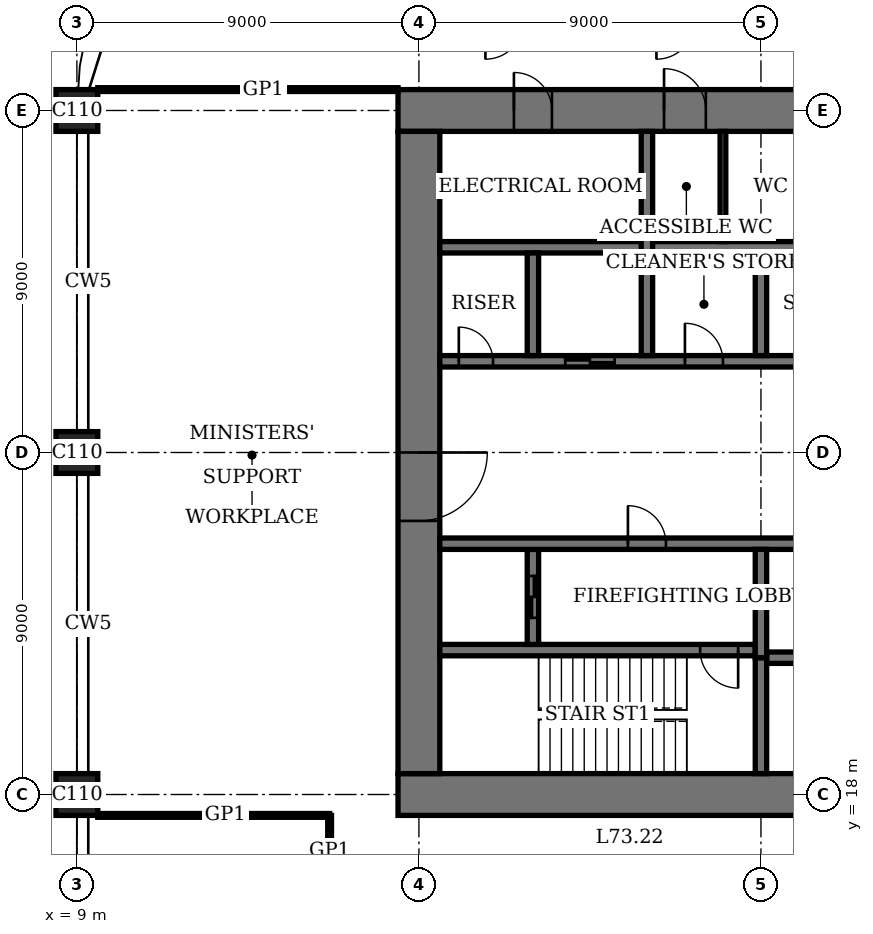
"""IFC4 building model, lengths in metres.
Left out: names, types, materials, properties, quantities, classifications, styles, units other than length and angle.
Written with IfcOpenShell. Run it as: python <this file> out.ifc"""

import sys

from ifc_helpers import new_model, si_unit, direction, frame, frame_2d, origin, origin_2d, place, context, subcontext, project, spatial, rectangle, extrude, element, fill, save


model = new_model("IFC4")
c1 = context("Model", 3, precision=1e-05, world=origin(), true_north=direction((0.0, 1.0)))
c2 = subcontext(c1, "Body", "Model", "MODEL_VIEW")
j1 = project(units=[si_unit("LENGTHUNIT", "METRE"), si_unit("PLANEANGLEUNIT", "RADIAN")], contexts=[c1])
p1 = place(None, origin())
s1 = spatial("IfcSite", under=j1, at=p1, CompositionType="ELEMENT")
p2 = place(p1, origin())
s2 = spatial("IfcBuilding", under=s1, at=p2, CompositionType="ELEMENT")
p3 = place(p2, frame((0.0, 0.0, 299.4)))
s3 = spatial("IfcBuildingStorey", under=s2, at=p3, CompositionType="ELEMENT", Elevation=299.4)
for number, where, z_axis, x_axis in (
    (1, (9.0, 18.0, 0.0), (0.0, 0.0, 1.0), (1.0, 0.0, 0.0)),
    (2, (9.0, 27.0, 0.0), (0.0, 0.0, 1.0), (1.0, 0.0, 0.0)),
    (3, (9.0, 36.0, 0.0), (0.0, 0.0, 1.0), (1.0, 0.0, 0.0)),
):
    element("IfcColumn", number, at=place(p3, frame(where, z_axis=z_axis, x_axis=x_axis)), inside=s3, PredefinedType="COLUMN", context=c2, shape_type="SweptSolid", body=[
        extrude(rectangle(XDim=1.1, YDim=1.1, at=origin_2d()), origin(), (0.0, 0.0, 1.0), 4.0),
    ])
p4 = place(p3, frame((17.45, 18.0, 0.0), z_axis=(0.0, 0.0, 1.0), x_axis=(1.0, 0.0, 0.0)))
e4 = element("IfcWall", 4, at=p4, inside=s3, PredefinedType="SHEAR", context=c2, shape_type="SweptSolid", body=[
    extrude(rectangle(XDim=28.1, YDim=1.1, at=frame_2d((14.05, 0.0))), origin(), (0.0, 0.0, 1.0), 4.0),
])
p5 = place(p4, frame((11.55, 0.0, 0.0)))
e5 = element("IfcOpeningElement", 5, at=p5, cuts=e4, PredefinedType="OPENING", context=c2, shape_type="SweptSolid", body=[
    extrude(rectangle(XDim=1.0, YDim=2.4, at=frame_2d((0.5, 1.2))), frame((0.0, 0.56, 0.0), z_axis=(0.0, -1.0, 0.0), x_axis=(1.0, 0.0, 0.0)), (0.0, 0.0, 1.0), 1.12),
])
p6 = place(p4, frame((16.55, 0.0, 0.0)))
e6 = element("IfcOpeningElement", 6, at=p6, cuts=e4, PredefinedType="OPENING", context=c2, shape_type="SweptSolid", body=[
    extrude(rectangle(XDim=1.0, YDim=2.4, at=frame_2d((0.5, 1.2))), frame((0.0, 0.56, 0.0), z_axis=(0.0, -1.0, 0.0), x_axis=(1.0, 0.0, 0.0)), (0.0, 0.0, 1.0), 1.12),
])
p7 = place(p4, frame((20.0, 0.0, 0.0)))
e7 = element("IfcOpeningElement", 7, at=p7, cuts=e4, PredefinedType="OPENING", context=c2, shape_type="SweptSolid", body=[
    extrude(rectangle(XDim=1.1, YDim=2.4, at=frame_2d((0.55, 1.2))), frame((0.0, 0.56, 0.0), z_axis=(0.0, -1.0, 0.0), x_axis=(1.0, 0.0, 0.0)), (0.0, 0.0, 1.0), 1.12),
])
p8 = place(p4, frame((24.05, 0.0, 0.0)))
e8 = element("IfcOpeningElement", 8, at=p8, cuts=e4, PredefinedType="OPENING", context=c2, shape_type="SweptSolid", body=[
    extrude(rectangle(XDim=1.0, YDim=2.4, at=frame_2d((0.5, 1.2))), frame((0.0, 0.56, 0.0), z_axis=(0.0, -1.0, 0.0), x_axis=(1.0, 0.0, 0.0)), (0.0, 0.0, 1.0), 1.12),
])
p9 = place(p3, frame((45.55, 36.0, 0.0), z_axis=(0.0, 0.0, 1.0), x_axis=(-1.0, 0.0, 0.0)))
e9 = element("IfcWall", 9, at=p9, inside=s3, PredefinedType="SHEAR", context=c2, shape_type="SweptSolid", body=[
    extrude(rectangle(XDim=28.1, YDim=1.1, at=frame_2d((14.05, 0.0))), origin(), (0.0, 0.0, 1.0), 4.0),
])
p10 = place(p9, frame((11.55, 0.0, 0.0)))
e10 = element("IfcOpeningElement", 10, at=p10, cuts=e9, PredefinedType="OPENING", context=c2, shape_type="SweptSolid", body=[
    extrude(rectangle(XDim=1.0, YDim=2.4, at=frame_2d((0.5, 1.2))), frame((0.0, 0.56, 0.0), z_axis=(0.0, -1.0, 0.0), x_axis=(1.0, 0.0, 0.0)), (0.0, 0.0, 1.0), 1.12),
])
p11 = place(p9, frame((16.55, 0.0, 0.0)))
e11 = element("IfcOpeningElement", 11, at=p11, cuts=e9, PredefinedType="OPENING", context=c2, shape_type="SweptSolid", body=[
    extrude(rectangle(XDim=1.0, YDim=2.4, at=frame_2d((0.5, 1.2))), frame((0.0, 0.56, 0.0), z_axis=(0.0, -1.0, 0.0), x_axis=(1.0, 0.0, 0.0)), (0.0, 0.0, 1.0), 1.12),
])
p12 = place(p9, frame((20.0, 0.0, 0.0)))
e12 = element("IfcOpeningElement", 12, at=p12, cuts=e9, PredefinedType="OPENING", context=c2, shape_type="SweptSolid", body=[
    extrude(rectangle(XDim=1.1, YDim=2.4, at=frame_2d((0.55, 1.2))), frame((0.0, 0.56, 0.0), z_axis=(0.0, -1.0, 0.0), x_axis=(1.0, 0.0, 0.0)), (0.0, 0.0, 1.0), 1.12),
])
p13 = place(p9, frame((24.05, 0.0, 0.0)))
e13 = element("IfcOpeningElement", 13, at=p13, cuts=e9, PredefinedType="OPENING", context=c2, shape_type="SweptSolid", body=[
    extrude(rectangle(XDim=1.0, YDim=2.4, at=frame_2d((0.5, 1.2))), frame((0.0, 0.56, 0.0), z_axis=(0.0, -1.0, 0.0), x_axis=(1.0, 0.0, 0.0)), (0.0, 0.0, 1.0), 1.12),
])
p14 = place(p3, frame((18.0, 35.45, 0.0), z_axis=(0.0, 0.0, 1.0), x_axis=(0.0, -1.0, 0.0)))
e14 = element("IfcWall", 14, at=p14, inside=s3, PredefinedType="SHEAR", context=c2, shape_type="SweptSolid", body=[
    extrude(rectangle(XDim=16.9, YDim=1.1, at=frame_2d((8.45, 0.0))), origin(), (0.0, 0.0, 1.0), 4.0),
])
p15 = place(p14, frame((8.45, 0.0, 0.0)))
e15 = element("IfcOpeningElement", 15, at=p15, cuts=e14, PredefinedType="OPENING", context=c2, shape_type="SweptSolid", body=[
    extrude(rectangle(XDim=1.8, YDim=2.4, at=frame_2d((0.9, 1.2))), frame((0.0, 0.56, 0.0), z_axis=(0.0, -1.0, 0.0), x_axis=(1.0, 0.0, 0.0)), (0.0, 0.0, 1.0), 1.12),
])
p16 = place(p3, frame((18.55, 21.8, 0.0), z_axis=(0.0, 0.0, 1.0), x_axis=(1.0, 0.0, 0.0)))
e16 = element("IfcWall", 16, at=p16, inside=s3, PredefinedType="SHEAR", context=c2, shape_type="SweptSolid", body=[
    extrude(rectangle(XDim=8.3, YDim=0.3, at=frame_2d((4.15, 0.0))), origin(), (0.0, 0.0, 1.0), 4.0),
])
p17 = place(p16, frame((6.85, 0.0, 0.0)))
e17 = element("IfcOpeningElement", 17, at=p17, cuts=e16, PredefinedType="OPENING", context=c2, shape_type="SweptSolid", body=[
    extrude(rectangle(XDim=1.0, YDim=2.4, at=frame_2d((0.5, 1.2))), frame((0.0, 0.16, 0.0), z_axis=(0.0, -1.0, 0.0), x_axis=(1.0, 0.0, 0.0)), (0.0, 0.0, 1.0), 0.32),
])
p18 = place(p3, frame((27.0, 18.55, 0.0), z_axis=(0.0, 0.0, 1.0), x_axis=(0.0, 1.0, 0.0)))
e18 = element("IfcWall", 18, at=p18, inside=s3, PredefinedType="SHEAR", context=c2, shape_type="SweptSolid", body=[
    extrude(rectangle(XDim=3.05, YDim=0.3, at=frame_2d((1.525, 0.0))), origin(), (0.0, 0.0, 1.0), 4.0),
])
p19 = place(p3, frame((21.0, 21.95, 0.0), z_axis=(0.0, 0.0, 1.0), x_axis=(0.0, 1.0, 0.0)))
e19 = element("IfcWall", 19, at=p19, inside=s3, PredefinedType="SHEAR", context=c2, shape_type="SweptSolid", body=[
    extrude(rectangle(XDim=2.5, YDim=0.3, at=frame_2d((1.25, 0.0))), origin(), (0.0, 0.0, 1.0), 4.0),
])
p20 = place(p19, frame((0.7, 0.0, 0.0)))
e20 = element("IfcOpeningElement", 20, at=p20, cuts=e19, PredefinedType="OPENING", context=c2, shape_type="SweptSolid", body=[
    extrude(rectangle(XDim=1.1, YDim=2.4, at=frame_2d((0.55, 1.2))), frame((0.0, 0.16, 0.0), z_axis=(0.0, -1.0, 0.0), x_axis=(1.0, 0.0, 0.0)), (0.0, 0.0, 1.0), 0.32),
])
p21 = place(p3, frame((18.55, 24.6, 0.0), z_axis=(0.0, 0.0, 1.0), x_axis=(1.0, 0.0, 0.0)))
e21 = element("IfcWall", 21, at=p21, inside=s3, PredefinedType="SHEAR", context=c2, shape_type="SweptSolid", body=[
    extrude(rectangle(XDim=25.9, YDim=0.3, at=frame_2d((12.95, 0.0))), origin(), (0.0, 0.0, 1.0), 4.0),
])
p22 = place(p21, frame((4.95, 0.0, 0.0)))
e22 = element("IfcOpeningElement", 22, at=p22, cuts=e21, PredefinedType="OPENING", context=c2, shape_type="SweptSolid", body=[
    extrude(rectangle(XDim=1.0, YDim=2.4, at=frame_2d((0.5, 1.2))), frame((0.0, 0.16, 0.0), z_axis=(0.0, -1.0, 0.0), x_axis=(1.0, 0.0, 0.0)), (0.0, 0.0, 1.0), 0.32),
])
p23 = place(p21, frame((24.5, 0.0, 0.0)))
e23 = element("IfcOpeningElement", 23, at=p23, cuts=e21, PredefinedType="OPENING", context=c2, shape_type="SweptSolid", body=[
    extrude(rectangle(XDim=0.9, YDim=2.1, at=frame_2d((0.45, 1.05))), frame((0.0, 0.16, 0.0), z_axis=(0.0, -1.0, 0.0), x_axis=(1.0, 0.0, 0.0)), (0.0, 0.0, 1.0), 0.32),
])
p24 = place(p21, frame((9.4, 0.0, 0.0)))
e24 = element("IfcOpeningElement", 24, at=p24, cuts=e21, PredefinedType="OPENING", context=c2, shape_type="SweptSolid", body=[
    extrude(rectangle(XDim=1.1, YDim=2.4, at=frame_2d((0.55, 1.2))), frame((0.0, 0.16, 0.0), z_axis=(0.0, -1.0, 0.0), x_axis=(1.0, 0.0, 0.0)), (0.0, 0.0, 1.0), 0.32),
])
p25 = place(p21, frame((12.4, 0.0, 0.0)))
e25 = element("IfcOpeningElement", 25, at=p25, cuts=e21, PredefinedType="OPENING", context=c2, shape_type="SweptSolid", body=[
    extrude(rectangle(XDim=1.1, YDim=2.4, at=frame_2d((0.55, 1.2))), frame((0.0, 0.16, 0.0), z_axis=(0.0, -1.0, 0.0), x_axis=(1.0, 0.0, 0.0)), (0.0, 0.0, 1.0), 0.32),
])
p26 = place(p21, frame((15.4, 0.0, 0.0)))
e26 = element("IfcOpeningElement", 26, at=p26, cuts=e21, PredefinedType="OPENING", context=c2, shape_type="SweptSolid", body=[
    extrude(rectangle(XDim=1.1, YDim=2.4, at=frame_2d((0.55, 1.2))), frame((0.0, 0.16, 0.0), z_axis=(0.0, -1.0, 0.0), x_axis=(1.0, 0.0, 0.0)), (0.0, 0.0, 1.0), 0.32),
])
p27 = place(p21, frame((18.4, 0.0, 0.0)))
e27 = element("IfcOpeningElement", 27, at=p27, cuts=e21, PredefinedType="OPENING", context=c2, shape_type="SweptSolid", body=[
    extrude(rectangle(XDim=1.1, YDim=2.4, at=frame_2d((0.55, 1.2))), frame((0.0, 0.16, 0.0), z_axis=(0.0, -1.0, 0.0), x_axis=(1.0, 0.0, 0.0)), (0.0, 0.0, 1.0), 0.32),
])
p28 = place(p21, frame((21.3, 0.0, 0.0)))
e28 = element("IfcOpeningElement", 28, at=p28, cuts=e21, PredefinedType="OPENING", context=c2, shape_type="SweptSolid", body=[
    extrude(rectangle(XDim=1.3, YDim=2.4, at=frame_2d((0.65, 1.2))), frame((0.0, 0.16, 0.0), z_axis=(0.0, -1.0, 0.0), x_axis=(1.0, 0.0, 0.0)), (0.0, 0.0, 1.0), 0.32),
])
p29 = place(p3, frame((18.55, 29.4, 0.0), z_axis=(0.0, 0.0, 1.0), x_axis=(1.0, 0.0, 0.0)))
e29 = element("IfcWall", 29, at=p29, inside=s3, PredefinedType="SHEAR", context=c2, shape_type="SweptSolid", body=[
    extrude(rectangle(XDim=25.9, YDim=0.3, at=frame_2d((12.95, 0.0))), origin(), (0.0, 0.0, 1.0), 4.0),
])
p30 = place(p29, frame((19.95, 0.0, 0.0)))
e30 = element("IfcOpeningElement", 30, at=p30, cuts=e29, PredefinedType="OPENING", context=c2, shape_type="SweptSolid", body=[
    extrude(rectangle(XDim=1.0, YDim=2.4, at=frame_2d((0.5, 1.2))), frame((0.0, 0.16, 0.0), z_axis=(0.0, -1.0, 0.0), x_axis=(1.0, 0.0, 0.0)), (0.0, 0.0, 1.0), 0.32),
])
p31 = place(p29, frame((0.5, 0.0, 0.0)))
e31 = element("IfcOpeningElement", 31, at=p31, cuts=e29, PredefinedType="OPENING", context=c2, shape_type="SweptSolid", body=[
    extrude(rectangle(XDim=0.9, YDim=2.1, at=frame_2d((0.45, 1.05))), frame((0.0, 0.16, 0.0), z_axis=(0.0, -1.0, 0.0), x_axis=(1.0, 0.0, 0.0)), (0.0, 0.0, 1.0), 0.32),
])
p32 = place(p29, frame((15.45, 0.0, 0.0)))
e32 = element("IfcOpeningElement", 32, at=p32, cuts=e29, PredefinedType="OPENING", context=c2, shape_type="SweptSolid", body=[
    extrude(rectangle(XDim=1.0, YDim=2.4, at=frame_2d((0.5, 1.2))), frame((0.0, 0.16, 0.0), z_axis=(0.0, -1.0, 0.0), x_axis=(1.0, 0.0, 0.0)), (0.0, 0.0, 1.0), 0.32),
])
p33 = place(p29, frame((12.45, 0.0, 0.0)))
e33 = element("IfcOpeningElement", 33, at=p33, cuts=e29, PredefinedType="OPENING", context=c2, shape_type="SweptSolid", body=[
    extrude(rectangle(XDim=1.0, YDim=2.4, at=frame_2d((0.5, 1.2))), frame((0.0, 0.16, 0.0), z_axis=(0.0, -1.0, 0.0), x_axis=(1.0, 0.0, 0.0)), (0.0, 0.0, 1.0), 0.32),
])
p34 = place(p29, frame((9.45, 0.0, 0.0)))
e34 = element("IfcOpeningElement", 34, at=p34, cuts=e29, PredefinedType="OPENING", context=c2, shape_type="SweptSolid", body=[
    extrude(rectangle(XDim=1.0, YDim=2.4, at=frame_2d((0.5, 1.2))), frame((0.0, 0.16, 0.0), z_axis=(0.0, -1.0, 0.0), x_axis=(1.0, 0.0, 0.0)), (0.0, 0.0, 1.0), 0.32),
])
p35 = place(p29, frame((6.45, 0.0, 0.0)))
e35 = element("IfcOpeningElement", 35, at=p35, cuts=e29, PredefinedType="OPENING", context=c2, shape_type="SweptSolid", body=[
    extrude(rectangle(XDim=1.0, YDim=2.4, at=frame_2d((0.5, 1.2))), frame((0.0, 0.16, 0.0), z_axis=(0.0, -1.0, 0.0), x_axis=(1.0, 0.0, 0.0)), (0.0, 0.0, 1.0), 0.32),
])
p36 = place(p29, frame((3.3, 0.0, 0.0)))
e36 = element("IfcOpeningElement", 36, at=p36, cuts=e29, PredefinedType="OPENING", context=c2, shape_type="SweptSolid", body=[
    extrude(rectangle(XDim=1.3, YDim=2.4, at=frame_2d((0.65, 1.2))), frame((0.0, 0.16, 0.0), z_axis=(0.0, -1.0, 0.0), x_axis=(1.0, 0.0, 0.0)), (0.0, 0.0, 1.0), 0.32),
])
for number, where, z_axis, x_axis in (
    (37, (27.15, 21.6, 0.0), (0.0, 0.0, 1.0), (1.0, 0.0, 0.0)),
    (38, (18.55, 32.4, 0.0), (0.0, 0.0, 1.0), (1.0, 0.0, 0.0)),
):
    element("IfcWall", number, at=place(p3, frame(where, z_axis=z_axis, x_axis=x_axis)), inside=s3, PredefinedType="SHEAR", context=c2, shape_type="SweptSolid", body=[
        extrude(rectangle(XDim=17.3, YDim=0.3, at=frame_2d((8.65, 0.0))), origin(), (0.0, 0.0, 1.0), 4.0),
    ])
p37 = place(p3, frame((27.0, 29.55, 0.0), z_axis=(0.0, 0.0, 1.0), x_axis=(0.0, 1.0, 0.0)))
e39 = element("IfcWall", 39, at=p37, inside=s3, PredefinedType="SHEAR", context=c2, shape_type="SweptSolid", body=[
    extrude(rectangle(XDim=2.7, YDim=0.3, at=frame_2d((1.35, 0.0))), origin(), (0.0, 0.0, 1.0), 4.0),
])
p38 = place(p3, frame((24.0, 29.55, 0.0), z_axis=(0.0, 0.0, 1.0), x_axis=(0.0, 1.0, 0.0)))
e40 = element("IfcWall", 40, at=p38, inside=s3, PredefinedType="SHEAR", context=c2, shape_type="SweptSolid", body=[
    extrude(rectangle(XDim=5.9, YDim=0.3, at=frame_2d((2.95, 0.0))), origin(), (0.0, 0.0, 1.0), 4.0),
])
p39 = place(p3, frame((21.0, 29.55, 0.0), z_axis=(0.0, 0.0, 1.0), x_axis=(0.0, 1.0, 0.0)))
e41 = element("IfcWall", 41, at=p39, inside=s3, PredefinedType="SHEAR", context=c2, shape_type="SweptSolid", body=[
    extrude(rectangle(XDim=2.7, YDim=0.3, at=frame_2d((1.35, 0.0))), origin(), (0.0, 0.0, 1.0), 4.0),
])
p40 = place(p3, frame((27.0, 21.6, 0.0), z_axis=(0.0, 0.0, 1.0), x_axis=(0.0, 1.0, 0.0)))
e42 = element("IfcWall", 42, at=p40, inside=s3, PredefinedType="SHEAR", context=c2, shape_type="SweptSolid", body=[
    extrude(rectangle(XDim=2.85, YDim=0.3, at=frame_2d((1.425, 0.0))), origin(), (0.0, 0.0, 1.0), 4.0),
])
p41 = place(p3, frame((9.55, 17.45, 0.0), z_axis=(0.0, 0.0, 1.0), x_axis=(1.0, 0.0, 0.0)))
e43 = element("IfcWall", 43, at=p41, inside=s3, PredefinedType="PARTITIONING", context=c2, shape_type="SweptSolid", body=[
    extrude(rectangle(XDim=6.1, YDim=0.1, at=frame_2d((3.05, 0.0))), origin(), (0.0, 0.0, 1.0), 3.75),
])
p42 = place(p3, frame((9.55, 36.55, 0.0), z_axis=(0.0, 0.0, 1.0), x_axis=(1.0, 0.0, 0.0)))
e44 = element("IfcWall", 44, at=p42, inside=s3, PredefinedType="PARTITIONING", context=c2, shape_type="SweptSolid", body=[
    extrude(rectangle(XDim=7.9, YDim=0.1, at=frame_2d((3.95, 0.0))), origin(), (0.0, 0.0, 1.0), 3.75),
])
p43 = place(p3, frame((15.65, 15.6, 0.0), z_axis=(0.0, 0.0, 1.0), x_axis=(0.0, 1.0, 0.0)))
e45 = element("IfcWall", 45, at=p43, inside=s3, PredefinedType="PARTITIONING", context=c2, shape_type="SweptSolid", body=[
    extrude(rectangle(XDim=1.85, YDim=0.1, at=frame_2d((0.925, 0.0))), origin(), (0.0, 0.0, 1.0), 3.75),
])
p44 = place(p3, frame((26.0, 32.55, 0.0), z_axis=(0.0, 0.0, 1.0), x_axis=(0.0, 1.0, 0.0)))
e46 = element("IfcWall", 46, at=p44, inside=s3, PredefinedType="PARTITIONING", context=c2, shape_type="SweptSolid", body=[
    extrude(rectangle(XDim=2.9, YDim=0.15, at=frame_2d((1.45, 0.0))), origin(), (0.0, 0.0, 1.0), 3.75),
])
p45 = place(p15, origin())
e47 = element("IfcDoor", 47, at=p45, inside=s3, OperationType="DOUBLE_DOOR_DOUBLE_SWING", PredefinedType="DOOR", context=c2, shape_type="SweptSolid", body=[
    extrude(rectangle(XDim=1.8, YDim=2.4, at=frame_2d((0.9, 1.2))), frame((0.0, 0.03, 0.0), z_axis=(0.0, -1.0, 0.0), x_axis=(1.0, 0.0, 0.0)), (0.0, 0.0, 1.0), 0.06),
    extrude(rectangle(XDim=0.04, YDim=2.4, at=frame_2d((0.02, 1.2))), frame((0.0, 0.55, 0.0), z_axis=(0.0, -1.0, 0.0), x_axis=(1.0, 0.0, 0.0)), (0.0, 0.0, 1.0), 1.1),
    extrude(rectangle(XDim=0.04, YDim=2.4, at=frame_2d((1.78, 1.2))), frame((0.0, 0.55, 0.0), z_axis=(0.0, -1.0, 0.0), x_axis=(1.0, 0.0, 0.0)), (0.0, 0.0, 1.0), 1.1),
    extrude(rectangle(XDim=1.8, YDim=0.04, at=frame_2d((0.9, 2.38))), frame((0.0, 0.55, 0.0), z_axis=(0.0, -1.0, 0.0), x_axis=(1.0, 0.0, 0.0)), (0.0, 0.0, 1.0), 1.1),
])
fill(e15, e47)
p46 = place(p12, origin())
e48 = element("IfcDoor", 48, at=p46, inside=s3, OperationType="SINGLE_SWING_RIGHT", PredefinedType="DOOR", context=c2, shape_type="SweptSolid", body=[
    extrude(rectangle(XDim=1.1, YDim=2.4, at=frame_2d((0.55, 1.2))), frame((0.0, 0.025, 0.0), z_axis=(0.0, -1.0, 0.0), x_axis=(1.0, 0.0, 0.0)), (0.0, 0.0, 1.0), 0.05),
    extrude(rectangle(XDim=0.04, YDim=2.4, at=frame_2d((0.02, 1.2))), frame((0.0, 0.44, 0.0), z_axis=(0.0, -1.0, 0.0), x_axis=(1.0, 0.0, 0.0)), (0.0, 0.0, 1.0), 0.88),
    extrude(rectangle(XDim=0.04, YDim=2.4, at=frame_2d((1.08, 1.2))), frame((0.0, 0.44, 0.0), z_axis=(0.0, -1.0, 0.0), x_axis=(1.0, 0.0, 0.0)), (0.0, 0.0, 1.0), 0.88),
    extrude(rectangle(XDim=1.1, YDim=0.04, at=frame_2d((0.55, 2.38))), frame((0.0, 0.44, 0.0), z_axis=(0.0, -1.0, 0.0), x_axis=(1.0, 0.0, 0.0)), (0.0, 0.0, 1.0), 0.88),
])
fill(e12, e48)
p47 = place(p13, origin())
e49 = element("IfcDoor", 49, at=p47, inside=s3, OperationType="SINGLE_SWING_RIGHT", PredefinedType="DOOR", context=c2, shape_type="SweptSolid", body=[
    extrude(rectangle(XDim=1.0, YDim=2.4, at=frame_2d((0.5, 1.2))), frame((0.0, 0.025, 0.0), z_axis=(0.0, -1.0, 0.0), x_axis=(1.0, 0.0, 0.0)), (0.0, 0.0, 1.0), 0.05),
    extrude(rectangle(XDim=0.04, YDim=2.4, at=frame_2d((0.02, 1.2))), frame((0.0, 0.4, 0.0), z_axis=(0.0, -1.0, 0.0), x_axis=(1.0, 0.0, 0.0)), (0.0, 0.0, 1.0), 0.8),
    extrude(rectangle(XDim=0.04, YDim=2.4, at=frame_2d((0.98, 1.2))), frame((0.0, 0.4, 0.0), z_axis=(0.0, -1.0, 0.0), x_axis=(1.0, 0.0, 0.0)), (0.0, 0.0, 1.0), 0.8),
    extrude(rectangle(XDim=1.0, YDim=0.04, at=frame_2d((0.5, 2.38))), frame((0.0, 0.4, 0.0), z_axis=(0.0, -1.0, 0.0), x_axis=(1.0, 0.0, 0.0)), (0.0, 0.0, 1.0), 0.8),
])
fill(e13, e49)
p48 = place(p17, origin())
e50 = element("IfcDoor", 50, at=p48, inside=s3, OperationType="SINGLE_SWING_RIGHT", PredefinedType="DOOR", context=c2, shape_type="SweptSolid", body=[
    extrude(rectangle(XDim=1.0, YDim=2.4, at=frame_2d((0.5, 1.2))), frame((0.0, 0.03, 0.0), z_axis=(0.0, -1.0, 0.0), x_axis=(1.0, 0.0, 0.0)), (0.0, 0.0, 1.0), 0.06),
])
fill(e17, e50)
p49 = place(p22, origin())
e51 = element("IfcDoor", 51, at=p49, inside=s3, OperationType="SINGLE_SWING_RIGHT", PredefinedType="DOOR", context=c2, shape_type="SweptSolid", body=[
    extrude(rectangle(XDim=1.0, YDim=2.4, at=frame_2d((0.5, 1.2))), frame((0.0, 0.03, 0.0), z_axis=(0.0, -1.0, 0.0), x_axis=(1.0, 0.0, 0.0)), (0.0, 0.0, 1.0), 0.06),
])
fill(e22, e51)
p50 = place(p31, origin())
e52 = element("IfcDoor", 52, at=p50, inside=s3, OperationType="SINGLE_SWING_RIGHT", PredefinedType="DOOR", context=c2, shape_type="SweptSolid", body=[
    extrude(rectangle(XDim=0.9, YDim=2.1, at=frame_2d((0.45, 1.05))), frame((0.0, 0.03, 0.0), z_axis=(0.0, -1.0, 0.0), x_axis=(1.0, 0.0, 0.0)), (0.0, 0.0, 1.0), 0.06),
])
fill(e31, e52)
p51 = place(p35, origin())
e53 = element("IfcDoor", 53, at=p51, inside=s3, OperationType="SINGLE_SWING_RIGHT", PredefinedType="DOOR", context=c2, shape_type="SweptSolid", body=[
    extrude(rectangle(XDim=1.0, YDim=2.4, at=frame_2d((0.5, 1.2))), frame((0.0, 0.03, 0.0), z_axis=(0.0, -1.0, 0.0), x_axis=(1.0, 0.0, 0.0)), (0.0, 0.0, 1.0), 0.06),
])
fill(e35, e53)
p52 = place(p36, origin())
e54 = element("IfcDoor", 54, at=p52, inside=s3, OperationType="DOUBLE_DOOR_SLIDING", PredefinedType="DOOR", context=c2, shape_type="SweptSolid", body=[
    extrude(rectangle(XDim=1.3, YDim=2.4, at=frame_2d((0.65, 1.2))), frame((0.0, 0.02, 0.0), z_axis=(0.0, -1.0, 0.0), x_axis=(1.0, 0.0, 0.0)), (0.0, 0.0, 1.0), 0.04),
])
fill(e36, e54)
p53 = place(p20, origin())
e55 = element("IfcDoor", 55, at=p53, inside=s3, OperationType="DOUBLE_DOOR_SLIDING", PredefinedType="DOOR", context=c2, shape_type="SweptSolid", body=[
    extrude(rectangle(XDim=1.1, YDim=2.4, at=frame_2d((0.55, 1.2))), frame((0.0, 0.03, 0.0), z_axis=(0.0, -1.0, 0.0), x_axis=(1.0, 0.0, 0.0)), (0.0, 0.0, 1.0), 0.06),
])
fill(e20, e55)
save(model, sys.argv[1])
